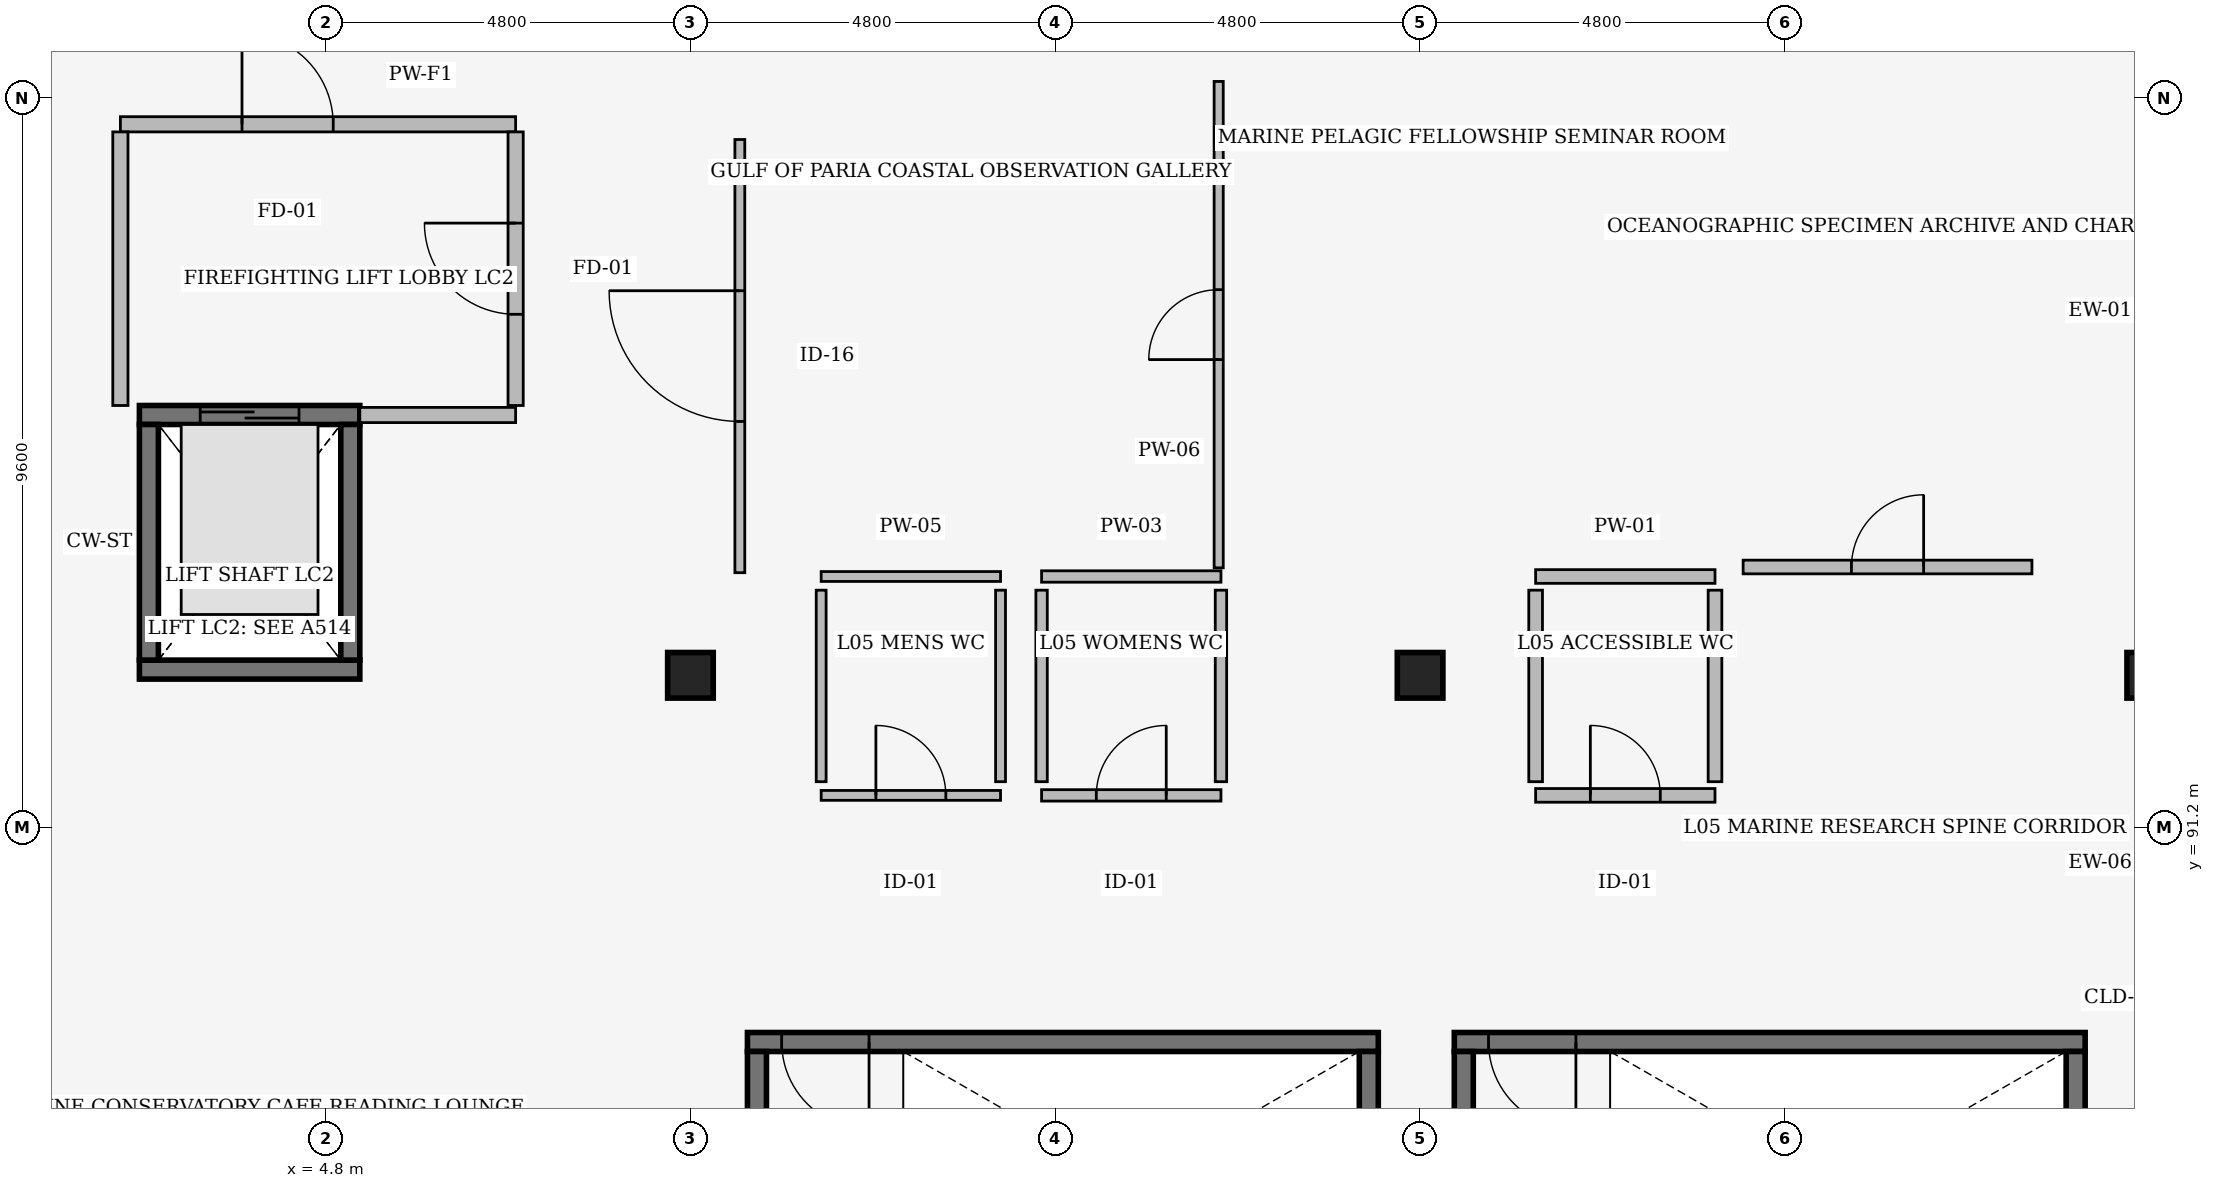
"""IFC4 building model, lengths in metres.
Left out: names, types, materials, properties, quantities, classifications, styles, units other than length and angle.
Written with IfcOpenShell. Run it as: python <this file> out.ifc"""

import sys

from ifc_helpers import new_model, si_unit, direction, frame, frame_2d, origin, origin_2d, place, context, subcontext, project, spatial, rectangle, extrude, element, fill, save


model = new_model("IFC4")
c1 = context("Model", 3, precision=1e-05, world=origin(), true_north=direction((0.0, 1.0)))
c2 = subcontext(c1, "Body", "Model", "MODEL_VIEW")
j1 = project(units=[si_unit("LENGTHUNIT", "METRE"), si_unit("PLANEANGLEUNIT", "RADIAN")], contexts=[c1])
p1 = place(None, origin())
s1 = spatial("IfcSite", under=j1, at=p1, CompositionType="ELEMENT")
p2 = place(p1, origin())
s2 = spatial("IfcBuilding", under=s1, at=p2, CompositionType="ELEMENT")
p3 = place(p2, frame((0.0, 0.0, 23.4)))
s3 = spatial("IfcBuildingStorey", under=s2, at=p3, CompositionType="ELEMENT", Elevation=23.4)
for number, where, z_axis, x_axis in (
    (1, (9.6, 93.2, 0.0), (0.0, 0.0, 1.0), (1.0, 0.0, 0.0)),
    (2, (19.2, 93.2, 0.0), (0.0, 0.0, 1.0), (1.0, 0.0, 0.0)),
    (3, (28.8, 93.2, 0.0), (0.0, 0.0, 1.0), (1.0, 0.0, 0.0)),
):
    element("IfcColumn", number, at=place(p3, frame(where, z_axis=z_axis, x_axis=x_axis)), inside=s3, PredefinedType="COLUMN", context=c2, shape_type="SweptSolid", body=[
        extrude(rectangle(XDim=0.6, YDim=0.6, at=origin_2d()), origin(), (0.0, 0.0, 1.0), 3.6),
    ])
p4 = place(p3, frame((18.65, 88.375, 0.0), z_axis=(0.0, 0.0, 1.0), x_axis=(-1.0, 0.0, 0.0)))
e4 = element("IfcWall", 4, at=p4, inside=s3, PredefinedType="SHEAR", context=c2, shape_type="SweptSolid", body=[
    extrude(rectangle(XDim=8.3, YDim=0.25, at=frame_2d((4.15, 0.0))), origin(), (0.0, 0.0, 1.0), 3.6),
])
p5 = place(p4, frame((7.85, 0.0, 0.0), z_axis=(0.0, 0.0, 1.0), x_axis=(-1.0, 0.0, 0.0)))
e5 = element("IfcOpeningElement", 5, at=p5, cuts=e4, PredefinedType="OPENING", context=c2, shape_type="SweptSolid", body=[
    extrude(rectangle(XDim=1.15, YDim=2.2, at=frame_2d((0.575, 1.1))), frame((0.0, 0.135, 0.0), z_axis=(0.0, -1.0, 0.0), x_axis=(1.0, 0.0, 0.0)), (0.0, 0.0, 1.0), 0.27),
])
for number, where, z_axis, x_axis in (
    (6, (10.475, 88.25, 0.0), (0.0, 0.0, 1.0), (0.0, -1.0, 0.0)),
    (7, (18.525, 84.8, 0.0), (0.0, 0.0, 1.0), (0.0, 1.0, 0.0)),
):
    element("IfcWall", number, at=place(p3, frame(where, z_axis=z_axis, x_axis=x_axis)), inside=s3, PredefinedType="SHEAR", context=c2, shape_type="SweptSolid", body=[
        extrude(rectangle(XDim=3.45, YDim=0.25, at=frame_2d((1.725, 0.0))), origin(), (0.0, 0.0, 1.0), 3.6),
    ])
p6 = place(p3, frame((27.95, 88.375, 0.0), z_axis=(0.0, 0.0, 1.0), x_axis=(-1.0, 0.0, 0.0)))
e8 = element("IfcWall", 8, at=p6, inside=s3, PredefinedType="SHEAR", context=c2, shape_type="SweptSolid", body=[
    extrude(rectangle(XDim=8.3, YDim=0.25, at=frame_2d((4.15, 0.0))), origin(), (0.0, 0.0, 1.0), 3.6),
])
p7 = place(p6, frame((7.85, 0.0, 0.0), z_axis=(0.0, 0.0, 1.0), x_axis=(-1.0, 0.0, 0.0)))
e9 = element("IfcOpeningElement", 9, at=p7, cuts=e8, PredefinedType="OPENING", context=c2, shape_type="SweptSolid", body=[
    extrude(rectangle(XDim=1.15, YDim=2.2, at=frame_2d((0.575, 1.1))), frame((0.0, 0.135, 0.0), z_axis=(0.0, -1.0, 0.0), x_axis=(1.0, 0.0, 0.0)), (0.0, 0.0, 1.0), 0.27),
])
for number, where, z_axis, x_axis in (
    (10, (19.775, 88.25, 0.0), (0.0, 0.0, 1.0), (0.0, -1.0, 0.0)),
    (11, (27.825, 84.8, 0.0), (0.0, 0.0, 1.0), (0.0, 1.0, 0.0)),
):
    element("IfcWall", number, at=place(p3, frame(where, z_axis=z_axis, x_axis=x_axis)), inside=s3, PredefinedType="SHEAR", context=c2, shape_type="SweptSolid", body=[
        extrude(rectangle(XDim=3.45, YDim=0.25, at=frame_2d((1.725, 0.0))), origin(), (0.0, 0.0, 1.0), 3.6),
    ])
p8 = place(p3, frame((2.35, 93.275, 0.0), z_axis=(0.0, 0.0, 1.0), x_axis=(1.0, 0.0, 0.0)))
e12 = element("IfcWall", 12, at=p8, inside=s3, PredefinedType="SHEAR", context=c2, shape_type="SweptSolid", body=[
    extrude(rectangle(XDim=2.9, YDim=0.25, at=frame_2d((1.45, 0.0))), origin(), (0.0, 0.0, 1.0), 3.6),
])
p9 = place(p3, frame((2.35, 96.625, 0.0), z_axis=(0.0, 0.0, 1.0), x_axis=(1.0, 0.0, 0.0)))
e13 = element("IfcWall", 13, at=p9, inside=s3, PredefinedType="SHEAR", context=c2, shape_type="SweptSolid", body=[
    extrude(rectangle(XDim=2.9, YDim=0.25, at=frame_2d((1.45, 0.0))), origin(), (0.0, 0.0, 1.0), 3.6),
])
p10 = place(p9, frame((0.8, 0.0, 0.0)))
e14 = element("IfcOpeningElement", 14, at=p10, cuts=e13, PredefinedType="OPENING", context=c2, shape_type="SweptSolid", body=[
    extrude(rectangle(XDim=1.3, YDim=2.2, at=frame_2d((0.65, 1.1))), frame((0.0, 0.135, 0.0), z_axis=(0.0, -1.0, 0.0), x_axis=(1.0, 0.0, 0.0)), (0.0, 0.0, 1.0), 0.27),
])
for number, where, z_axis, x_axis in (
    (15, (2.475, 93.4, 0.0), (0.0, 0.0, 1.0), (0.0, 1.0, 0.0)),
    (16, (5.125, 93.4, 0.0), (0.0, 0.0, 1.0), (0.0, 1.0, 0.0)),
):
    element("IfcWall", number, at=place(p3, frame(where, z_axis=z_axis, x_axis=x_axis)), inside=s3, PredefinedType="SHEAR", context=c2, shape_type="SweptSolid", body=[
        extrude(rectangle(XDim=3.1, YDim=0.25, at=frame_2d((1.55, 0.0))), origin(), (0.0, 0.0, 1.0), 3.6),
    ])
p11 = place(p3, frame((2.1, 100.45, 0.0), z_axis=(0.0, 0.0, 1.0), x_axis=(1.0, 0.0, 0.0)))
e17 = element("IfcWall", 17, at=p11, inside=s3, PredefinedType="PARTITIONING", context=c2, shape_type="SweptSolid", body=[
    extrude(rectangle(XDim=5.2, YDim=0.2, at=frame_2d((2.6, 0.0))), origin(), (0.0, 0.0, 1.0), 3.24),
])
p12 = place(p11, frame((1.6, 0.0, 0.0)))
e18 = element("IfcOpeningElement", 18, at=p12, cuts=e17, PredefinedType="OPENING", context=c2, shape_type="SweptSolid", body=[
    extrude(rectangle(XDim=1.2, YDim=2.2, at=frame_2d((0.6, 1.1))), frame((0.0, 0.11, 0.0), z_axis=(0.0, -1.0, 0.0), x_axis=(1.0, 0.0, 0.0)), (0.0, 0.0, 1.0), 0.22),
])
p13 = place(p3, frame((2.1, 96.75, 0.0), z_axis=(0.0, 0.0, 1.0), x_axis=(0.0, 1.0, 0.0)))
e19 = element("IfcWall", 19, at=p13, inside=s3, PredefinedType="PARTITIONING", context=c2, shape_type="SweptSolid", body=[
    extrude(rectangle(XDim=3.6, YDim=0.2, at=frame_2d((1.8, 0.0))), origin(), (0.0, 0.0, 1.0), 3.24),
])
p14 = place(p3, frame((7.3, 96.75, 0.0), z_axis=(0.0, 0.0, 1.0), x_axis=(0.0, 1.0, 0.0)))
e20 = element("IfcWall", 20, at=p14, inside=s3, PredefinedType="PARTITIONING", context=c2, shape_type="SweptSolid", body=[
    extrude(rectangle(XDim=3.6, YDim=0.2, at=frame_2d((1.8, 0.0))), origin(), (0.0, 0.0, 1.0), 3.24),
])
p15 = place(p14, frame((1.2, 0.0, 0.0)))
e21 = element("IfcOpeningElement", 21, at=p15, cuts=e20, PredefinedType="OPENING", context=c2, shape_type="SweptSolid", body=[
    extrude(rectangle(XDim=1.2, YDim=2.2, at=frame_2d((0.6, 1.1))), frame((0.0, 0.11, 0.0), z_axis=(0.0, -1.0, 0.0), x_axis=(1.0, 0.0, 0.0)), (0.0, 0.0, 1.0), 0.22),
])
p16 = place(p3, frame((5.25, 96.625, 0.0), z_axis=(0.0, 0.0, 1.0), x_axis=(1.0, 0.0, 0.0)))
e22 = element("IfcWall", 22, at=p16, inside=s3, PredefinedType="PARTITIONING", context=c2, shape_type="SweptSolid", body=[
    extrude(rectangle(XDim=2.05, YDim=0.2, at=frame_2d((1.025, 0.0))), origin(), (0.0, 0.0, 1.0), 3.24),
])
p17 = place(p3, frame((11.32, 94.5, 0.0), z_axis=(0.0, 0.0, 1.0), x_axis=(1.0, 0.0, 0.0)))
e23 = element("IfcWall", 23, at=p17, inside=s3, PredefinedType="PARTITIONING", context=c2, shape_type="SweptSolid", body=[
    extrude(rectangle(XDim=2.36, YDim=0.13, at=frame_2d((1.18, 0.0))), origin(), (0.0, 0.0, 1.0), 3.24),
])
p18 = place(p3, frame((11.32, 91.62, 0.0), z_axis=(0.0, 0.0, 1.0), x_axis=(1.0, 0.0, 0.0)))
e24 = element("IfcWall", 24, at=p18, inside=s3, PredefinedType="PARTITIONING", context=c2, shape_type="SweptSolid", body=[
    extrude(rectangle(XDim=2.36, YDim=0.13, at=frame_2d((1.18, 0.0))), origin(), (0.0, 0.0, 1.0), 3.24),
])
p19 = place(p18, frame((0.72, 0.0, 0.0)))
e25 = element("IfcOpeningElement", 25, at=p19, cuts=e24, PredefinedType="OPENING", context=c2, shape_type="SweptSolid", body=[
    extrude(rectangle(XDim=0.92, YDim=2.12, at=frame_2d((0.46, 1.06))), frame((0.0, 0.075, 0.0), z_axis=(0.0, -1.0, 0.0), x_axis=(1.0, 0.0, 0.0)), (0.0, 0.0, 1.0), 0.15),
])
for number, where, z_axis, x_axis in (
    (26, (11.32, 91.8, 0.0), (0.0, 0.0, 1.0), (0.0, 1.0, 0.0)),
    (27, (13.68, 91.8, 0.0), (0.0, 0.0, 1.0), (0.0, 1.0, 0.0)),
):
    element("IfcWall", number, at=place(p3, frame(where, z_axis=z_axis, x_axis=x_axis)), inside=s3, PredefinedType="PARTITIONING", context=c2, shape_type="SweptSolid", body=[
        extrude(rectangle(XDim=2.52, YDim=0.13, at=frame_2d((1.26, 0.0))), origin(), (0.0, 0.0, 1.0), 3.24),
    ])
p20 = place(p3, frame((14.22, 94.5, 0.0), z_axis=(0.0, 0.0, 1.0), x_axis=(1.0, 0.0, 0.0)))
e28 = element("IfcWall", 28, at=p20, inside=s3, PredefinedType="PARTITIONING", context=c2, shape_type="SweptSolid", body=[
    extrude(rectangle(XDim=2.36, YDim=0.15, at=frame_2d((1.18, 0.0))), origin(), (0.0, 0.0, 1.0), 3.24),
])
p21 = place(p3, frame((14.22, 91.62, 0.0), z_axis=(0.0, 0.0, 1.0), x_axis=(1.0, 0.0, 0.0)))
e29 = element("IfcWall", 29, at=p21, inside=s3, PredefinedType="PARTITIONING", context=c2, shape_type="SweptSolid", body=[
    extrude(rectangle(XDim=2.36, YDim=0.15, at=frame_2d((1.18, 0.0))), origin(), (0.0, 0.0, 1.0), 3.24),
])
p22 = place(p21, frame((0.72, 0.0, 0.0)))
e30 = element("IfcOpeningElement", 30, at=p22, cuts=e29, PredefinedType="OPENING", context=c2, shape_type="SweptSolid", body=[
    extrude(rectangle(XDim=0.92, YDim=2.12, at=frame_2d((0.46, 1.06))), frame((0.0, 0.085, 0.0), z_axis=(0.0, -1.0, 0.0), x_axis=(1.0, 0.0, 0.0)), (0.0, 0.0, 1.0), 0.17),
])
for number, where, z_axis, x_axis in (
    (31, (14.22, 91.8, 0.0), (0.0, 0.0, 1.0), (0.0, 1.0, 0.0)),
    (32, (16.58, 91.8, 0.0), (0.0, 0.0, 1.0), (0.0, 1.0, 0.0)),
):
    element("IfcWall", number, at=place(p3, frame(where, z_axis=z_axis, x_axis=x_axis)), inside=s3, PredefinedType="PARTITIONING", context=c2, shape_type="SweptSolid", body=[
        extrude(rectangle(XDim=2.52, YDim=0.15, at=frame_2d((1.26, 0.0))), origin(), (0.0, 0.0, 1.0), 3.24),
    ])
p23 = place(p3, frame((20.72, 94.5, 0.0), z_axis=(0.0, 0.0, 1.0), x_axis=(1.0, 0.0, 0.0)))
e33 = element("IfcWall", 33, at=p23, inside=s3, PredefinedType="PARTITIONING", context=c2, shape_type="SweptSolid", body=[
    extrude(rectangle(XDim=2.36, YDim=0.18, at=frame_2d((1.18, 0.0))), origin(), (0.0, 0.0, 1.0), 3.24),
])
p24 = place(p3, frame((20.72, 91.62, 0.0), z_axis=(0.0, 0.0, 1.0), x_axis=(1.0, 0.0, 0.0)))
e34 = element("IfcWall", 34, at=p24, inside=s3, PredefinedType="PARTITIONING", context=c2, shape_type="SweptSolid", body=[
    extrude(rectangle(XDim=2.36, YDim=0.18, at=frame_2d((1.18, 0.0))), origin(), (0.0, 0.0, 1.0), 3.24),
])
p25 = place(p24, frame((0.72, 0.0, 0.0)))
e35 = element("IfcOpeningElement", 35, at=p25, cuts=e34, PredefinedType="OPENING", context=c2, shape_type="SweptSolid", body=[
    extrude(rectangle(XDim=0.92, YDim=2.12, at=frame_2d((0.46, 1.06))), frame((0.0, 0.1, 0.0), z_axis=(0.0, -1.0, 0.0), x_axis=(1.0, 0.0, 0.0)), (0.0, 0.0, 1.0), 0.2),
])
for number, where, z_axis, x_axis in (
    (36, (20.72, 91.8, 0.0), (0.0, 0.0, 1.0), (0.0, 1.0, 0.0)),
    (37, (23.08, 91.8, 0.0), (0.0, 0.0, 1.0), (0.0, 1.0, 0.0)),
):
    element("IfcWall", number, at=place(p3, frame(where, z_axis=z_axis, x_axis=x_axis)), inside=s3, PredefinedType="PARTITIONING", context=c2, shape_type="SweptSolid", body=[
        extrude(rectangle(XDim=2.52, YDim=0.18, at=frame_2d((1.26, 0.0))), origin(), (0.0, 0.0, 1.0), 3.24),
    ])
p26 = place(p3, frame((10.25, 94.55, 0.0), z_axis=(0.0, 0.0, 1.0), x_axis=(0.0, 1.0, 0.0)))
e38 = element("IfcWall", 38, at=p26, inside=s3, PredefinedType="PARTITIONING", context=c2, shape_type="SweptSolid", body=[
    extrude(rectangle(XDim=5.7, YDim=0.13, at=frame_2d((2.85, 0.0))), origin(), (0.0, 0.0, 1.0), 3.24),
])
p27 = place(p26, frame((1.99, 0.0, 0.0)))
e39 = element("IfcOpeningElement", 39, at=p27, cuts=e38, PredefinedType="OPENING", context=c2, shape_type="SweptSolid", body=[
    extrude(rectangle(XDim=1.72, YDim=2.38, at=frame_2d((0.86, 1.19))), frame((0.0, 0.075, 0.0), z_axis=(0.0, -1.0, 0.0), x_axis=(1.0, 0.0, 0.0)), (0.0, 0.0, 1.0), 0.15),
])
p28 = place(p3, frame((16.55, 94.614, 0.0), z_axis=(0.0, 0.0, 1.0), x_axis=(0.0, 1.0, 0.0)))
e40 = element("IfcWall", 40, at=p28, inside=s3, PredefinedType="PARTITIONING", context=c2, shape_type="SweptSolid", body=[
    extrude(rectangle(XDim=6.4, YDim=0.12, at=frame_2d((3.2, 0.0))), origin(), (0.0, 0.0, 1.0), 3.24),
])
p29 = place(p28, frame((2.74, 0.0, 0.0)))
e41 = element("IfcOpeningElement", 41, at=p29, cuts=e40, PredefinedType="OPENING", context=c2, shape_type="SweptSolid", body=[
    extrude(rectangle(XDim=0.92, YDim=2.12, at=frame_2d((0.46, 1.06))), frame((0.0, 0.07, 0.0), z_axis=(0.0, -1.0, 0.0), x_axis=(1.0, 0.0, 0.0)), (0.0, 0.0, 1.0), 0.14),
])
p30 = place(p3, frame((23.45, 94.625, 0.0), z_axis=(0.0, 0.0, 1.0), x_axis=(1.0, 0.0, 0.0)))
e42 = element("IfcWall", 42, at=p30, inside=s3, PredefinedType="PARTITIONING", context=c2, shape_type="SweptSolid", body=[
    extrude(rectangle(XDim=3.8, YDim=0.18, at=frame_2d((1.9, 0.0))), origin(), (0.0, 0.0, 1.0), 3.24),
])
p31 = place(p30, frame((1.425, 0.0, 0.0)))
e43 = element("IfcOpeningElement", 43, at=p31, cuts=e42, PredefinedType="OPENING", context=c2, shape_type="SweptSolid", body=[
    extrude(rectangle(XDim=0.95, YDim=2.15, at=frame_2d((0.475, 1.075))), frame((0.0, 0.1, 0.0), z_axis=(0.0, -1.0, 0.0), x_axis=(1.0, 0.0, 0.0)), (0.0, 0.0, 1.0), 0.2),
])
p32 = place(p5, origin())
e44 = element("IfcDoor", 44, at=p32, inside=s3, OperationType="SINGLE_SWING_RIGHT", PredefinedType="DOOR", context=c2, shape_type="SweptSolid", body=[
    extrude(rectangle(XDim=1.15, YDim=2.2, at=frame_2d((0.575, 1.1))), frame((0.0, 0.025, 0.0), z_axis=(0.0, -1.0, 0.0), x_axis=(1.0, 0.0, 0.0)), (0.0, 0.0, 1.0), 0.05),
])
fill(e5, e44)
p33 = place(p7, origin())
e45 = element("IfcDoor", 45, at=p33, inside=s3, OperationType="SINGLE_SWING_RIGHT", PredefinedType="DOOR", context=c2, shape_type="SweptSolid", body=[
    extrude(rectangle(XDim=1.15, YDim=2.2, at=frame_2d((0.575, 1.1))), frame((0.0, 0.025, 0.0), z_axis=(0.0, -1.0, 0.0), x_axis=(1.0, 0.0, 0.0)), (0.0, 0.0, 1.0), 0.05),
])
fill(e9, e45)
p34 = place(p10, origin())
e46 = element("IfcDoor", 46, at=p34, inside=s3, OperationType="DOUBLE_DOOR_SLIDING", PredefinedType="DOOR", context=c2, shape_type="SweptSolid", body=[
    extrude(rectangle(XDim=1.3, YDim=2.2, at=frame_2d((0.65, 1.1))), frame((0.0, 0.025, 0.0), z_axis=(0.0, -1.0, 0.0), x_axis=(1.0, 0.0, 0.0)), (0.0, 0.0, 1.0), 0.05),
])
fill(e14, e46)
p35 = place(p15, origin())
e47 = element("IfcDoor", 47, at=p35, inside=s3, OperationType="SINGLE_SWING_RIGHT", PredefinedType="DOOR", context=c2, shape_type="SweptSolid", body=[
    extrude(rectangle(XDim=1.2, YDim=2.2, at=frame_2d((0.6, 1.1))), frame((0.0, 0.025, 0.0), z_axis=(0.0, -1.0, 0.0), x_axis=(1.0, 0.0, 0.0)), (0.0, 0.0, 1.0), 0.05),
])
fill(e21, e47)
p36 = place(p12, origin())
e48 = element("IfcDoor", 48, at=p36, inside=s3, OperationType="SINGLE_SWING_LEFT", PredefinedType="DOOR", context=c2, shape_type="SweptSolid", body=[
    extrude(rectangle(XDim=1.2, YDim=2.2, at=frame_2d((0.6, 1.1))), frame((0.0, 0.025, 0.0), z_axis=(0.0, -1.0, 0.0), x_axis=(1.0, 0.0, 0.0)), (0.0, 0.0, 1.0), 0.05),
])
fill(e18, e48)
p37 = place(p19, origin())
e49 = element("IfcDoor", 49, at=p37, inside=s3, OperationType="SINGLE_SWING_LEFT", PredefinedType="DOOR", context=c2, shape_type="SweptSolid", body=[
    extrude(rectangle(XDim=0.92, YDim=2.12, at=frame_2d((0.46, 1.06))), frame((0.0, 0.025, 0.0), z_axis=(0.0, -1.0, 0.0), x_axis=(1.0, 0.0, 0.0)), (0.0, 0.0, 1.0), 0.05),
])
fill(e25, e49)
p38 = place(p22, origin())
e50 = element("IfcDoor", 50, at=p38, inside=s3, OperationType="SINGLE_SWING_RIGHT", PredefinedType="DOOR", context=c2, shape_type="SweptSolid", body=[
    extrude(rectangle(XDim=0.92, YDim=2.12, at=frame_2d((0.46, 1.06))), frame((0.0, 0.025, 0.0), z_axis=(0.0, -1.0, 0.0), x_axis=(1.0, 0.0, 0.0)), (0.0, 0.0, 1.0), 0.05),
])
fill(e30, e50)
p39 = place(p25, origin())
e51 = element("IfcDoor", 51, at=p39, inside=s3, OperationType="SINGLE_SWING_LEFT", PredefinedType="DOOR", context=c2, shape_type="SweptSolid", body=[
    extrude(rectangle(XDim=0.92, YDim=2.12, at=frame_2d((0.46, 1.06))), frame((0.0, 0.025, 0.0), z_axis=(0.0, -1.0, 0.0), x_axis=(1.0, 0.0, 0.0)), (0.0, 0.0, 1.0), 0.05),
])
fill(e35, e51)
p40 = place(p27, origin())
e52 = element("IfcDoor", 52, at=p40, inside=s3, OperationType="SINGLE_SWING_RIGHT", PredefinedType="DOOR", context=c2, shape_type="SweptSolid", body=[
    extrude(rectangle(XDim=1.72, YDim=2.38, at=frame_2d((0.86, 1.19))), frame((0.0, 0.025, 0.0), z_axis=(0.0, -1.0, 0.0), x_axis=(1.0, 0.0, 0.0)), (0.0, 0.0, 1.0), 0.05),
])
fill(e39, e52)
p41 = place(p29, origin())
e53 = element("IfcDoor", 53, at=p41, inside=s3, OperationType="SINGLE_SWING_LEFT", PredefinedType="DOOR", context=c2, shape_type="SweptSolid", body=[
    extrude(rectangle(XDim=0.92, YDim=2.12, at=frame_2d((0.46, 1.06))), frame((0.0, 0.025, 0.0), z_axis=(0.0, -1.0, 0.0), x_axis=(1.0, 0.0, 0.0)), (0.0, 0.0, 1.0), 0.05),
])
fill(e41, e53)
p42 = place(p31, origin())
e54 = element("IfcDoor", 54, at=p42, inside=s3, OperationType="SINGLE_SWING_RIGHT", PredefinedType="DOOR", context=c2, shape_type="SweptSolid", body=[
    extrude(rectangle(XDim=0.95, YDim=2.15, at=frame_2d((0.475, 1.075))), frame((0.0, 0.025, 0.0), z_axis=(0.0, -1.0, 0.0), x_axis=(1.0, 0.0, 0.0)), (0.0, 0.0, 1.0), 0.05),
])
fill(e43, e54)
save(model, sys.argv[1])
